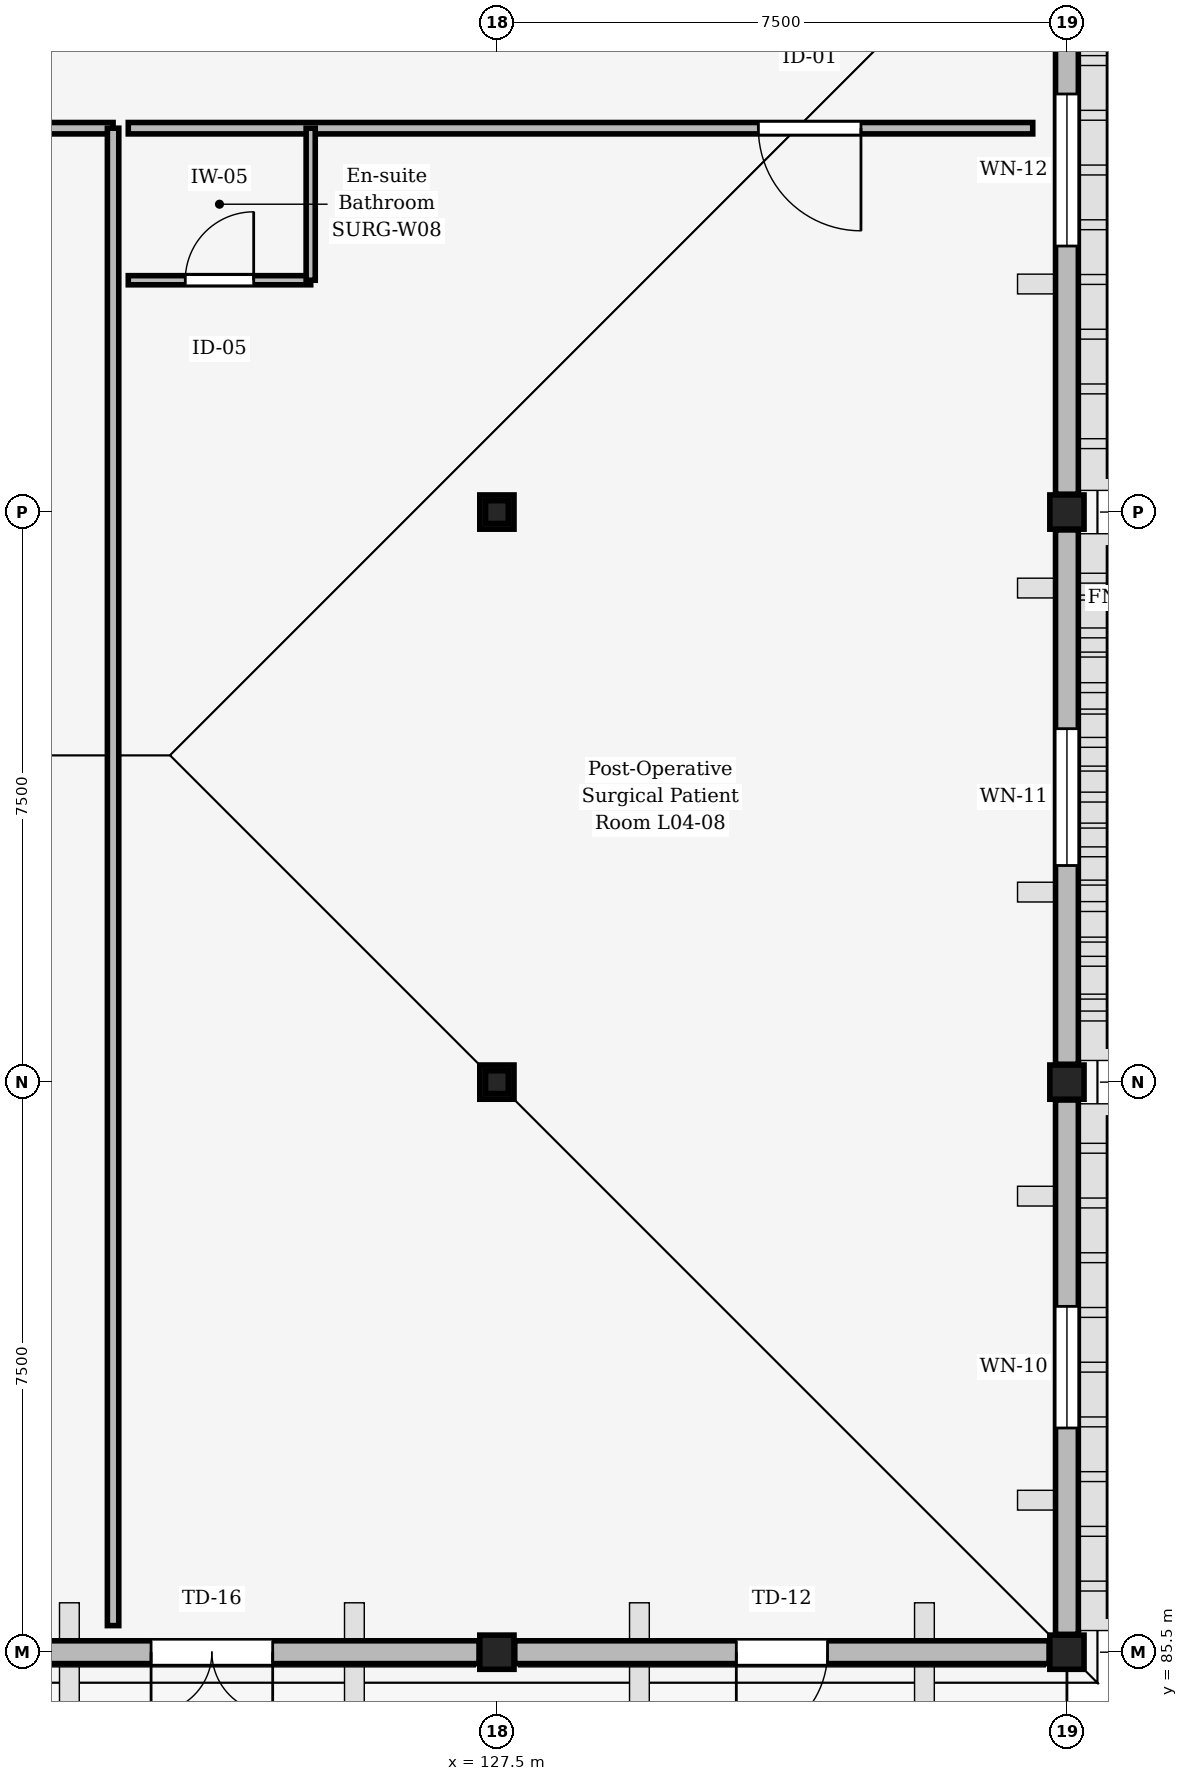
"""IFC4 building model, lengths in metres.
Left out: names, types, materials, properties, quantities, classifications, styles, units other than length and angle.
Written with IfcOpenShell. Run it as: python <this file> out.ifc"""

import sys

from ifc_helpers import new_model, si_unit, direction, frame, frame_2d, origin, origin_2d, place, context, subcontext, project, spatial, rectangle, i_section, extrude, element, fill, save


model = new_model("IFC4")
c1 = context("Model", 3, precision=1e-05, world=origin(), true_north=direction((0.0, 1.0)))
c2 = subcontext(c1, "Body", "Model", "MODEL_VIEW")
j1 = project(units=[si_unit("LENGTHUNIT", "METRE"), si_unit("PLANEANGLEUNIT", "RADIAN")], contexts=[c1])
p1 = place(None, origin())
s1 = spatial("IfcSite", under=j1, at=p1, CompositionType="ELEMENT")
p2 = place(p1, origin())
s2 = spatial("IfcBuilding", under=s1, at=p2, CompositionType="ELEMENT")
p3 = place(p2, frame((0.0, 0.0, 17.85)))
s3 = spatial("IfcBuildingStorey", under=s2, at=p3, CompositionType="ELEMENT", Elevation=17.85)
for number, where, z_axis, x_axis in (
    (1, (127.5, 85.5, 0.0), (0.0, 0.0, 1.0), (1.0, 0.0, 0.0)),
    (2, (127.5, 93.0, 0.0), (0.0, 0.0, 1.0), (1.0, 0.0, 0.0)),
    (3, (127.5, 100.5, 0.0), (0.0, 0.0, 1.0), (1.0, 0.0, 0.0)),
    (4, (135.0, 85.5, 0.0), (0.0, 0.0, 1.0), (1.0, 0.0, 0.0)),
    (5, (135.0, 93.0, 0.0), (0.0, 0.0, 1.0), (1.0, 0.0, 0.0)),
    (6, (135.0, 100.5, 0.0), (0.0, 0.0, 1.0), (1.0, 0.0, 0.0)),
):
    element("IfcColumn", number, at=place(p3, frame(where, z_axis=z_axis, x_axis=x_axis)), inside=s3, PredefinedType="COLUMN", context=c2, shape_type="SweptSolid", body=[
        extrude(rectangle(XDim=0.45, YDim=0.45, at=origin_2d()), origin(), (0.0, 0.0, 1.0), 4.05),
    ])
for number, where, z_axis, x_axis in (
    (7, (127.5, 93.0, 4.05), (0.0, 0.0, 1.0), (1.0, 0.0, 0.0)),
    (8, (127.5, 100.5, 4.05), (0.0, 0.0, 1.0), (1.0, 0.0, 0.0)),
):
    element("IfcColumn", number, at=place(p3, frame(where, z_axis=z_axis, x_axis=x_axis)), inside=s3, PredefinedType="COLUMN", context=c2, shape_type="SweptSolid", body=[
        extrude(i_section(OverallWidth=0.3, OverallDepth=0.3, WebThickness=0.011, FlangeThickness=0.019, FilletRadius=0.027, at=origin_2d()), origin(), (0.0, 0.0, 1.0), 1.97),
    ])
p4 = place(p3, frame((127.265, 85.5, 0.0), z_axis=(0.0, 0.0, 1.0), x_axis=(-1.0, 0.0, 0.0)))
e9 = element("IfcWall", 9, at=p4, inside=s3, PredefinedType="STANDARD", context=c2, shape_type="SweptSolid", body=[
    extrude(rectangle(XDim=7.03, YDim=0.3, at=frame_2d((3.515, 0.0))), origin(), (0.0, 0.0, 1.0), 3.77),
])
p5 = place(p4, frame((2.715, 0.0, 0.0)))
e10 = element("IfcOpeningElement", 10, at=p5, cuts=e9, PredefinedType="OPENING", context=c2, shape_type="SweptSolid", body=[
    extrude(rectangle(XDim=1.6, YDim=2.35, at=frame_2d((0.8, 1.175))), frame((0.0, 0.16, 0.0), z_axis=(0.0, -1.0, 0.0), x_axis=(1.0, 0.0, 0.0)), (0.0, 0.0, 1.0), 0.32),
])
p6 = place(p3, frame((134.765, 85.5, 0.0), z_axis=(0.0, 0.0, 1.0), x_axis=(-1.0, 0.0, 0.0)))
e11 = element("IfcWall", 11, at=p6, inside=s3, PredefinedType="STANDARD", context=c2, shape_type="SweptSolid", body=[
    extrude(rectangle(XDim=7.03, YDim=0.3, at=frame_2d((3.515, 0.0))), origin(), (0.0, 0.0, 1.0), 3.77),
])
p7 = place(p6, frame((2.915, 0.0, 0.0)))
e12 = element("IfcOpeningElement", 12, at=p7, cuts=e11, PredefinedType="OPENING", context=c2, shape_type="SweptSolid", body=[
    extrude(rectangle(XDim=1.2, YDim=2.3, at=frame_2d((0.6, 1.15))), frame((0.0, 0.16, 0.0), z_axis=(0.0, -1.0, 0.0), x_axis=(1.0, 0.0, 0.0)), (0.0, 0.0, 1.0), 0.32),
])
p8 = place(p3, frame((135.0, 92.765, 0.0), z_axis=(0.0, 0.0, 1.0), x_axis=(0.0, -1.0, 0.0)))
e13 = element("IfcWall", 13, at=p8, inside=s3, PredefinedType="STANDARD", context=c2, shape_type="SweptSolid", body=[
    extrude(rectangle(XDim=7.03, YDim=0.3, at=frame_2d((3.515, 0.0))), origin(), (0.0, 0.0, 1.0), 3.77),
])
p9 = place(p8, frame((2.715, 0.0, 0.9)))
e14 = element("IfcOpeningElement", 14, at=p9, cuts=e13, PredefinedType="OPENING", context=c2, shape_type="SweptSolid", body=[
    extrude(rectangle(XDim=1.6, YDim=1.95, at=frame_2d((0.8, 0.975))), frame((0.0, 0.16, 0.0), z_axis=(0.0, -1.0, 0.0), x_axis=(1.0, 0.0, 0.0)), (0.0, 0.0, 1.0), 0.32),
])
p10 = place(p3, frame((135.0, 100.265, 0.0), z_axis=(0.0, 0.0, 1.0), x_axis=(0.0, -1.0, 0.0)))
e15 = element("IfcWall", 15, at=p10, inside=s3, PredefinedType="STANDARD", context=c2, shape_type="SweptSolid", body=[
    extrude(rectangle(XDim=7.03, YDim=0.3, at=frame_2d((3.515, 0.0))), origin(), (0.0, 0.0, 1.0), 3.77),
])
p11 = place(p10, frame((2.615, 0.0, 0.9)))
e16 = element("IfcOpeningElement", 16, at=p11, cuts=e15, PredefinedType="OPENING", context=c2, shape_type="SweptSolid", body=[
    extrude(rectangle(XDim=1.8, YDim=1.95, at=frame_2d((0.9, 0.975))), frame((0.0, 0.16, 0.0), z_axis=(0.0, -1.0, 0.0), x_axis=(1.0, 0.0, 0.0)), (0.0, 0.0, 1.0), 0.32),
])
p12 = place(p3, frame((135.0, 109.265, 0.0), z_axis=(0.0, 0.0, 1.0), x_axis=(0.0, -1.0, 0.0)))
e17 = element("IfcWall", 17, at=p12, inside=s3, PredefinedType="STANDARD", context=c2, shape_type="SweptSolid", body=[
    extrude(rectangle(XDim=8.53, YDim=0.3, at=frame_2d((4.265, 0.0))), origin(), (0.0, 0.0, 1.0), 3.77),
])
p13 = place(p12, frame((3.265, 0.0, 0.9)))
e18 = element("IfcOpeningElement", 18, at=p13, cuts=e17, PredefinedType="OPENING", context=c2, shape_type="SweptSolid", body=[
    extrude(rectangle(XDim=2.0, YDim=1.95, at=frame_2d((1.0, 0.975))), frame((0.0, 0.16, 0.0), z_axis=(0.0, -1.0, 0.0), x_axis=(1.0, 0.0, 0.0)), (0.0, 0.0, 1.0), 0.32),
])
p14 = place(p3, frame((122.45, 105.55, 0.0), z_axis=(0.0, 0.0, 1.0), x_axis=(-1.0, 0.0, 0.0)))
e19 = element("IfcWall", 19, at=p14, inside=s3, PredefinedType="PARTITIONING", context=c2, shape_type="SweptSolid", body=[
    extrude(rectangle(XDim=11.9, YDim=0.15, at=frame_2d((5.95, 0.0))), origin(), (0.0, 0.0, 1.0), 3.755),
])
p15 = place(p14, frame((5.275, 0.0, 0.0)))
e20 = element("IfcOpeningElement", 20, at=p15, cuts=e19, PredefinedType="OPENING", context=c2, shape_type="SweptSolid", body=[
    extrude(rectangle(XDim=1.35, YDim=2.25, at=frame_2d((0.675, 1.125))), frame((0.0, 0.085, 0.0), z_axis=(0.0, -1.0, 0.0), x_axis=(1.0, 0.0, 0.0)), (0.0, 0.0, 1.0), 0.17),
])
p16 = place(p3, frame((134.55, 105.55, 0.0), z_axis=(0.0, 0.0, 1.0), x_axis=(-1.0, 0.0, 0.0)))
e21 = element("IfcWall", 21, at=p16, inside=s3, PredefinedType="PARTITIONING", context=c2, shape_type="SweptSolid", body=[
    extrude(rectangle(XDim=11.9, YDim=0.15, at=frame_2d((5.95, 0.0))), origin(), (0.0, 0.0, 1.0), 3.755),
])
p17 = place(p16, frame((2.26, 0.0, 0.0)))
e22 = element("IfcOpeningElement", 22, at=p17, cuts=e21, PredefinedType="OPENING", context=c2, shape_type="SweptSolid", body=[
    extrude(rectangle(XDim=1.35, YDim=2.25, at=frame_2d((0.675, 1.125))), frame((0.0, 0.085, 0.0), z_axis=(0.0, -1.0, 0.0), x_axis=(1.0, 0.0, 0.0)), (0.0, 0.0, 1.0), 0.17),
])
p18 = place(p3, frame((122.65, 103.55, 0.0), z_axis=(0.0, 0.0, 1.0), x_axis=(1.0, 0.0, 0.0)))
e23 = element("IfcWall", 23, at=p18, inside=s3, PredefinedType="PARTITIONING", context=c2, shape_type="SweptSolid", body=[
    extrude(rectangle(XDim=2.4, YDim=0.12, at=frame_2d((1.2, 0.0))), origin(), (0.0, 0.0, 1.0), 3.755),
])
p19 = place(p18, frame((0.75, 0.0, 0.0)))
e24 = element("IfcOpeningElement", 24, at=p19, cuts=e23, PredefinedType="OPENING", context=c2, shape_type="SweptSolid", body=[
    extrude(rectangle(XDim=0.9, YDim=2.1, at=frame_2d((0.45, 1.05))), frame((0.0, 0.07, 0.0), z_axis=(0.0, -1.0, 0.0), x_axis=(1.0, 0.0, 0.0)), (0.0, 0.0, 1.0), 0.14),
])
p20 = place(p3, frame((125.05, 103.55, 0.0), z_axis=(0.0, 0.0, 1.0), x_axis=(0.0, 1.0, 0.0)))
e25 = element("IfcWall", 25, at=p20, inside=s3, PredefinedType="PARTITIONING", context=c2, shape_type="SweptSolid", body=[
    extrude(rectangle(XDim=2.0, YDim=0.12, at=frame_2d((1.0, 0.0))), origin(), (0.0, 0.0, 1.0), 3.755),
])
p21 = place(p3, frame((122.45, 85.85, 0.0), z_axis=(0.0, 0.0, 1.0), x_axis=(0.0, 1.0, 0.0)))
e26 = element("IfcWall", 26, at=p21, inside=s3, PredefinedType="PARTITIONING", context=c2, shape_type="SweptSolid", body=[
    extrude(rectangle(XDim=19.7, YDim=0.15, at=frame_2d((9.85, 0.0))), origin(), (0.0, 0.0, 1.0), 3.755),
])
p22 = place(p5, origin())
e27 = element("IfcDoor", 27, at=p22, inside=s3, OperationType="DOUBLE_DOOR_SINGLE_SWING", PredefinedType="DOOR", context=c2, shape_type="SweptSolid", body=[
    extrude(rectangle(XDim=1.6, YDim=2.35, at=frame_2d((0.8, 1.175))), frame((0.0, 0.025, 0.0), z_axis=(0.0, -1.0, 0.0), x_axis=(1.0, 0.0, 0.0)), (0.0, 0.0, 1.0), 0.05),
])
fill(e10, e27)
p23 = place(p7, origin())
e28 = element("IfcDoor", 28, at=p23, inside=s3, OperationType="SINGLE_SWING_RIGHT", PredefinedType="DOOR", context=c2, shape_type="SweptSolid", body=[
    extrude(rectangle(XDim=1.2, YDim=2.3, at=frame_2d((0.6, 1.15))), frame((0.0, 0.025, 0.0), z_axis=(0.0, -1.0, 0.0), x_axis=(1.0, 0.0, 0.0)), (0.0, 0.0, 1.0), 0.05),
])
fill(e12, e28)
p24 = place(p9, origin())
e29 = element("IfcWindow", 29, at=p24, inside=s3, PartitioningType="SINGLE_PANEL", PredefinedType="WINDOW", context=c2, shape_type="SweptSolid", body=[
    extrude(rectangle(XDim=1.6, YDim=1.95, at=frame_2d((0.8, 0.975))), frame((0.0, 0.03, 0.0), z_axis=(0.0, -1.0, 0.0), x_axis=(1.0, 0.0, 0.0)), (0.0, 0.0, 1.0), 0.06),
])
fill(e14, e29)
p25 = place(p11, origin())
e30 = element("IfcWindow", 30, at=p25, inside=s3, PartitioningType="SINGLE_PANEL", PredefinedType="WINDOW", context=c2, shape_type="SweptSolid", body=[
    extrude(rectangle(XDim=1.8, YDim=1.95, at=frame_2d((0.9, 0.975))), frame((0.0, 0.03, 0.0), z_axis=(0.0, -1.0, 0.0), x_axis=(1.0, 0.0, 0.0)), (0.0, 0.0, 1.0), 0.06),
])
fill(e16, e30)
p26 = place(p13, origin())
e31 = element("IfcWindow", 31, at=p26, inside=s3, PartitioningType="SINGLE_PANEL", PredefinedType="WINDOW", context=c2, shape_type="SweptSolid", body=[
    extrude(rectangle(XDim=2.0, YDim=1.95, at=frame_2d((1.0, 0.975))), frame((0.0, 0.03, 0.0), z_axis=(0.0, -1.0, 0.0), x_axis=(1.0, 0.0, 0.0)), (0.0, 0.0, 1.0), 0.06),
])
fill(e18, e31)
p27 = place(p17, origin())
e32 = element("IfcDoor", 32, at=p27, inside=s3, OperationType="SINGLE_SWING_LEFT", PredefinedType="DOOR", context=c2, shape_type="SweptSolid", body=[
    extrude(rectangle(XDim=1.35, YDim=2.25, at=frame_2d((0.675, 1.125))), frame((0.0, 0.025, 0.0), z_axis=(0.0, -1.0, 0.0), x_axis=(1.0, 0.0, 0.0)), (0.0, 0.0, 1.0), 0.05),
])
fill(e22, e32)
p28 = place(p19, origin())
e33 = element("IfcDoor", 33, at=p28, inside=s3, OperationType="SINGLE_SWING_RIGHT", PredefinedType="DOOR", context=c2, shape_type="SweptSolid", body=[
    extrude(rectangle(XDim=0.9, YDim=2.1, at=frame_2d((0.45, 1.05))), frame((0.0, 0.025, 0.0), z_axis=(0.0, -1.0, 0.0), x_axis=(1.0, 0.0, 0.0)), (0.0, 0.0, 1.0), 0.05),
])
fill(e24, e33)
save(model, sys.argv[1])
